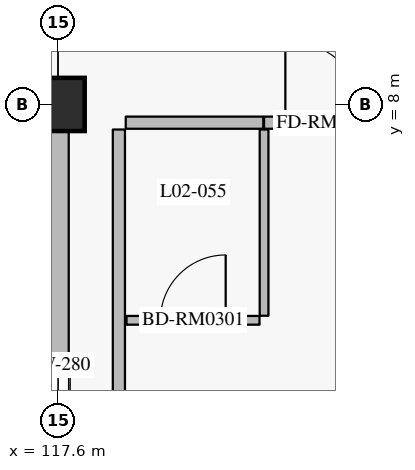
"""IFC4 building model, lengths in metres.
Left out: names, types, materials, properties, quantities, classifications, styles, units other than length and angle.
Written with IfcOpenShell. Run it as: python <this file> out.ifc"""

import sys

from ifc_helpers import new_model, si_unit, direction, frame, frame_2d, origin, origin_2d, place, context, subcontext, project, spatial, rectangle, extrude, element, fill, save


model = new_model("IFC4")
c1 = context("Model", 3, precision=1e-05, world=origin(), true_north=direction((0.0, 1.0)))
c2 = subcontext(c1, "Body", "Model", "MODEL_VIEW")
j1 = project(units=[si_unit("LENGTHUNIT", "METRE"), si_unit("PLANEANGLEUNIT", "RADIAN")], contexts=[c1])
p1 = place(None, origin())
s1 = spatial("IfcSite", under=j1, at=p1, CompositionType="ELEMENT")
p2 = place(p1, origin())
s2 = spatial("IfcBuilding", under=s1, at=p2, CompositionType="ELEMENT")
p3 = place(p2, frame((0.0, 0.0, 11.4)))
s3 = spatial("IfcBuildingStorey", under=s2, at=p3, CompositionType="ELEMENT", Elevation=11.4)
p4 = place(p3, frame((117.6, 8.0, 0.0), z_axis=(0.0, 0.0, 1.0), x_axis=(1.0, 0.0, 0.0)))
e1 = element("IfcColumn", 1, at=p4, inside=s3, PredefinedType="COLUMN", context=c2, shape_type="SweptSolid", body=[
    extrude(rectangle(XDim=0.7, YDim=0.7, at=origin_2d()), origin(), (0.0, 0.0, 1.0), 4.8),
])
p5 = place(p3, frame((117.6, 0.4, 0.0), z_axis=(0.0, 0.0, 1.0), x_axis=(0.0, 1.0, 0.0)))
e2 = element("IfcWall", 2, at=p5, inside=s3, PredefinedType="SOLIDWALL", context=c2, shape_type="SweptSolid", body=[
    extrude(rectangle(XDim=7.25, YDim=0.28, at=frame_2d((3.625, 0.0))), origin(), (0.0, 0.0, 1.0), 3.9),
])
p6 = place(p5, frame((2.975, 0.0, 0.75)))
e3 = element("IfcOpeningElement", 3, at=p6, cuts=e2, PredefinedType="OPENING", context=c2, shape_type="SweptSolid", body=[
    extrude(rectangle(XDim=1.3, YDim=1.65, at=frame_2d((0.65, 0.825))), frame((0.0, 0.15, 0.0), z_axis=(0.0, -1.0, 0.0), x_axis=(1.0, 0.0, 0.0)), (0.0, 0.0, 1.0), 0.3),
])
p7 = place(p3, frame((118.49, 7.76, 0.0), z_axis=(0.0, 0.0, 1.0), x_axis=(1.0, 0.0, 0.0)))
e4 = element("IfcWall", 4, at=p7, inside=s3, PredefinedType="PARTITIONING", context=c2, shape_type="SweptSolid", body=[
    extrude(rectangle(XDim=1.81, YDim=0.16, at=frame_2d((0.905, 0.0))), origin(), (0.0, 0.0, 1.0), 4.535),
])
p8 = place(p3, frame((120.31, 7.76, 0.0), z_axis=(0.0, 0.0, 1.0), x_axis=(1.0, 0.0, 0.0)))
e5 = element("IfcWall", 5, at=p8, inside=s3, PredefinedType="PARTITIONING", context=c2, shape_type="SweptSolid", body=[
    extrude(rectangle(XDim=1.64, YDim=0.16, at=frame_2d((0.82, 0.0))), origin(), (0.0, 0.0, 1.0), 4.535),
])
p9 = place(p8, frame((0.28, 0.0, 0.0)))
e6 = element("IfcOpeningElement", 6, at=p9, cuts=e5, PredefinedType="OPENING", context=c2, shape_type="SweptSolid", body=[
    extrude(rectangle(XDim=1.08, YDim=2.3, at=frame_2d((0.54, 1.15))), frame((0.0, 0.09, 0.0), z_axis=(0.0, -1.0, 0.0), x_axis=(1.0, 0.0, 0.0)), (0.0, 0.0, 1.0), 0.18),
])
p10 = place(p3, frame((120.31, 5.22, 0.0), z_axis=(0.0, 0.0, 1.0), x_axis=(0.0, 1.0, 0.0)))
e7 = element("IfcWall", 7, at=p10, inside=s3, PredefinedType="PARTITIONING", context=c2, shape_type="SweptSolid", body=[
    extrude(rectangle(XDim=2.45, YDim=0.115, at=frame_2d((1.225, 0.0))), origin(), (0.0, 0.0, 1.0), 4.535),
])
p11 = place(p3, frame((118.5, 5.16, 0.0), z_axis=(0.0, 0.0, 1.0), x_axis=(1.0, 0.0, 0.0)))
e8 = element("IfcWall", 8, at=p11, inside=s3, PredefinedType="PARTITIONING", context=c2, shape_type="SweptSolid", body=[
    extrude(rectangle(XDim=1.75, YDim=0.115, at=frame_2d((0.875, 0.0))), origin(), (0.0, 0.0, 1.0), 4.535),
])
p12 = place(p11, frame((0.445, 0.0, 0.0)))
e9 = element("IfcOpeningElement", 9, at=p12, cuts=e8, PredefinedType="OPENING", context=c2, shape_type="SweptSolid", body=[
    extrude(rectangle(XDim=0.86, YDim=2.12, at=frame_2d((0.43, 1.06))), frame((0.0, 0.067, 0.0), z_axis=(0.0, -1.0, 0.0), x_axis=(1.0, 0.0, 0.0)), (0.0, 0.0, 1.0), 0.135),
])
p13 = place(p3, frame((118.4, 0.34, 0.0), z_axis=(0.0, 0.0, 1.0), x_axis=(0.0, 1.0, 0.0)))
e10 = element("IfcWall", 10, at=p13, inside=s3, PredefinedType="PARTITIONING", context=c2, shape_type="SweptSolid", body=[
    extrude(rectangle(XDim=7.33, YDim=0.16, at=frame_2d((3.665, 0.0))), origin(), (0.0, 0.0, 1.0), 4.535),
])
p14 = place(p6, origin())
e11 = element("IfcWindow", 11, at=p14, inside=s3, PartitioningType="SINGLE_PANEL", PredefinedType="WINDOW", context=c2, shape_type="SweptSolid", body=[
    extrude(rectangle(XDim=1.3, YDim=1.65, at=frame_2d((0.65, 0.825))), frame((0.0, 0.03, 0.0), z_axis=(0.0, -1.0, 0.0), x_axis=(1.0, 0.0, 0.0)), (0.0, 0.0, 1.0), 0.06),
])
fill(e3, e11)
p15 = place(p9, origin())
e12 = element("IfcDoor", 12, at=p15, inside=s3, OperationType="SINGLE_SWING_LEFT", PredefinedType="DOOR", context=c2, shape_type="SweptSolid", body=[
    extrude(rectangle(XDim=1.08, YDim=2.3, at=frame_2d((0.54, 1.15))), frame((0.0, 0.025, 0.0), z_axis=(0.0, -1.0, 0.0), x_axis=(1.0, 0.0, 0.0)), (0.0, 0.0, 1.0), 0.05),
])
fill(e6, e12)
p16 = place(p12, origin())
e13 = element("IfcDoor", 13, at=p16, inside=s3, OperationType="SINGLE_SWING_RIGHT", PredefinedType="DOOR", context=c2, shape_type="SweptSolid", body=[
    extrude(rectangle(XDim=0.86, YDim=2.12, at=frame_2d((0.43, 1.06))), frame((0.0, 0.025, 0.0), z_axis=(0.0, -1.0, 0.0), x_axis=(1.0, 0.0, 0.0)), (0.0, 0.0, 1.0), 0.05),
])
fill(e9, e13)
save(model, sys.argv[1])
